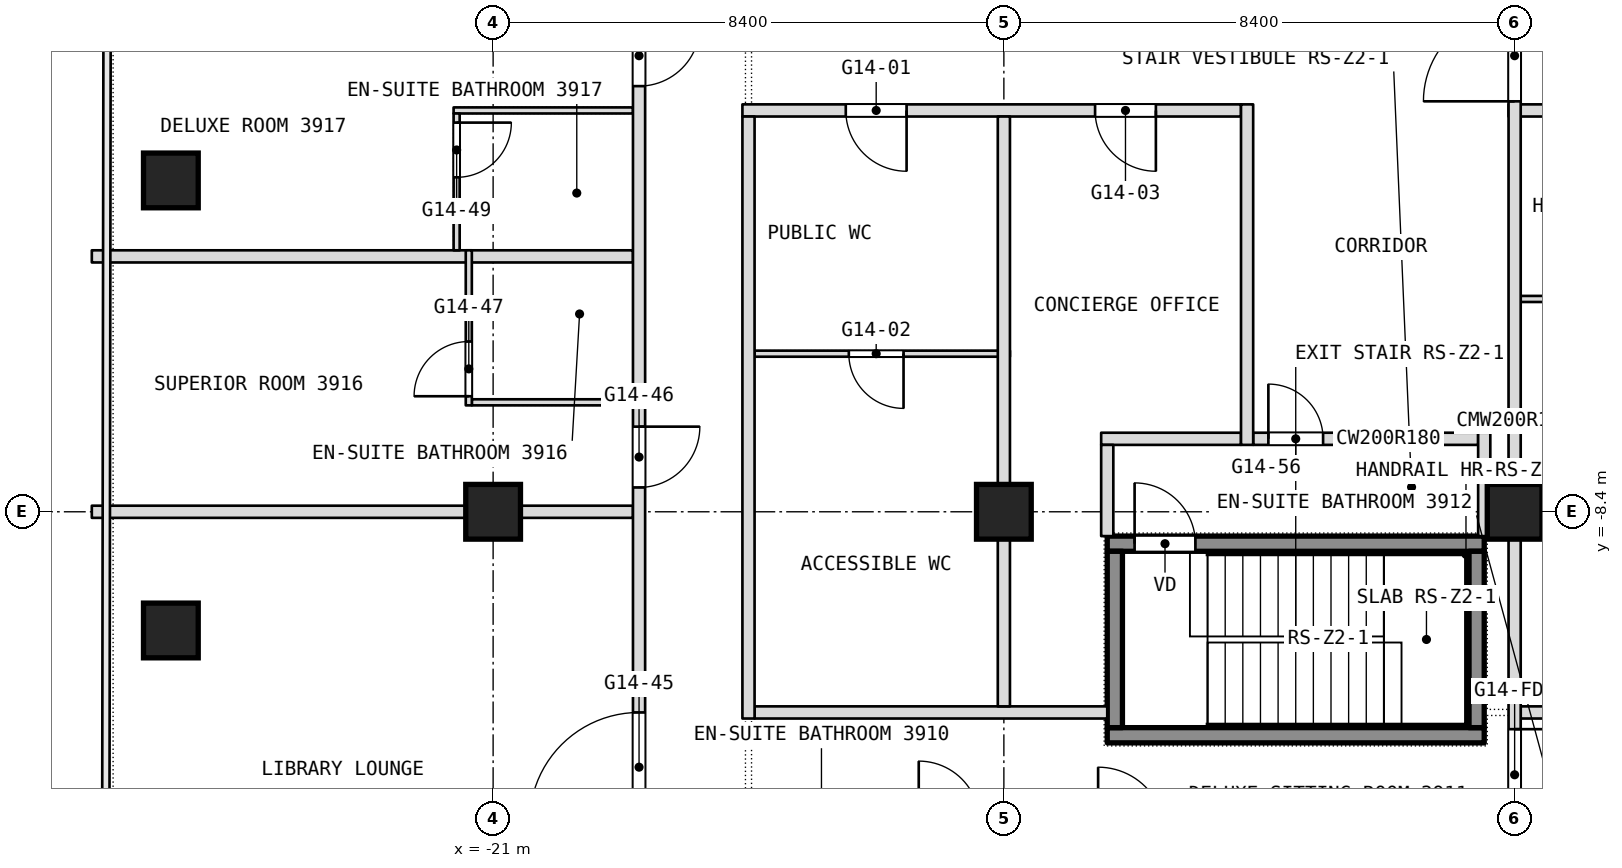
"""IFC4 building model, lengths in metres.
Left out: names, types, materials, properties, quantities, classifications, styles, units other than length and angle.
Written with IfcOpenShell. Run it as: python <this file> out.ifc"""

import sys

from ifc_helpers import new_model, si_unit, direction, frame, frame_2d, origin, origin_2d, place, context, subcontext, project, spatial, rectangle, extrude, element, fill, save


model = new_model("IFC4")
c1 = context("Model", 3, precision=1e-05, world=origin(), true_north=direction((0.0, 1.0)))
c2 = subcontext(c1, "Body", "Model", "MODEL_VIEW")
j1 = project(units=[si_unit("LENGTHUNIT", "METRE"), si_unit("PLANEANGLEUNIT", "RADIAN")], contexts=[c1])
p1 = place(None, origin())
s1 = spatial("IfcSite", under=j1, at=p1, CompositionType="ELEMENT")
p2 = place(p1, origin())
s2 = spatial("IfcBuilding", under=s1, at=p2, CompositionType="ELEMENT")
p3 = place(p2, frame((0.0, 0.0, 166.1)))
s3 = spatial("IfcBuildingStorey", under=s2, at=p3, CompositionType="ELEMENT", Elevation=166.1)
for number, where, z_axis, x_axis in (
    (1, (-21.0, -8.4, 0.0), (0.0, 0.0, 1.0), (1.0, 0.0, 0.0)),
    (2, (-12.6, -8.4, 0.0), (0.0, 0.0, 1.0), (1.0, 0.0, 0.0)),
    (3, (-4.2, -8.4, 0.0), (0.0, 0.0, 1.0), (1.0, 0.0, 0.0)),
    (4, (-26.3, -10.352, 0.0), (0.0, 0.0, 1.0), (1.0, 0.0, 0.0)),
    (5, (-26.3, -2.951, 0.0), (0.0, 0.0, 1.0), (1.0, 0.0, 0.0)),
):
    element("IfcColumn", number, at=place(p3, frame(where, z_axis=z_axis, x_axis=x_axis)), inside=s3, PredefinedType="COLUMN", context=c2, shape_type="SweptSolid", body=[
        extrude(rectangle(XDim=0.9, YDim=0.9, at=origin_2d()), origin(), (0.0, 0.0, 1.0), 3.6),
    ])
p4 = place(p3, frame((-16.7, -11.7, 0.0), z_axis=(0.0, 0.0, 1.0), x_axis=(1.0, 0.0, 0.0)))
e6 = element("IfcWall", 6, at=p4, inside=s3, PredefinedType="PARTITIONING", context=c2, shape_type="SweptSolid", body=[
    extrude(rectangle(XDim=5.8, YDim=0.2, at=frame_2d((2.9, 0.0))), origin(), (0.0, 0.0, 1.0), 3.3),
])
p5 = place(p3, frame((-4.1, -11.7, 0.0), z_axis=(0.0, 0.0, 1.0), x_axis=(1.0, 0.0, 0.0)))
e7 = element("IfcWall", 7, at=p5, inside=s3, PredefinedType="PARTITIONING", context=c2, shape_type="SweptSolid", body=[
    extrude(rectangle(XDim=20.8, YDim=0.2, at=frame_2d((10.4, 0.0))), origin(), (0.0, 0.0, 1.0), 3.3),
])
p6 = place(p5, frame((14.1, 0.0, 0.0)))
e8 = element("IfcOpeningElement", 8, at=p6, cuts=e7, PredefinedType="OPENING", context=c2, shape_type="SweptSolid", body=[
    extrude(rectangle(XDim=1.0, YDim=2.1, at=frame_2d((0.5, 1.05))), frame((0.0, 0.1, 0.0), z_axis=(0.0, -1.0, 0.0), x_axis=(1.0, 0.0, 0.0)), (0.0, 0.0, 1.0), 0.2),
])
p7 = place(p5, frame((5.7, 0.0, 0.0)))
e9 = element("IfcOpeningElement", 9, at=p7, cuts=e7, PredefinedType="OPENING", context=c2, shape_type="SweptSolid", body=[
    extrude(rectangle(XDim=1.0, YDim=2.1, at=frame_2d((0.5, 1.05))), frame((0.0, 0.1, 0.0), z_axis=(0.0, -1.0, 0.0), x_axis=(1.0, 0.0, 0.0)), (0.0, 0.0, 1.0), 0.2),
])
p8 = place(p3, frame((-27.6, -8.4, 0.0), z_axis=(0.0, 0.0, 1.0), x_axis=(1.0, 0.0, 0.0)))
e10 = element("IfcWall", 10, at=p8, inside=s3, PredefinedType="PARTITIONING", context=c2, shape_type="SweptSolid", body=[
    extrude(rectangle(XDim=8.9, YDim=0.2, at=frame_2d((4.45, 0.0))), origin(), (0.0, 0.0, 1.0), 2.85),
])
p9 = place(p3, frame((-11.0, -7.2, 0.0), z_axis=(0.0, 0.0, 1.0), x_axis=(1.0, 0.0, 0.0)))
e11 = element("IfcWall", 11, at=p9, inside=s3, PredefinedType="PARTITIONING", context=c2, shape_type="SweptSolid", body=[
    extrude(rectangle(XDim=2.3, YDim=0.2, at=frame_2d((1.15, 0.0))), origin(), (0.0, 0.0, 1.0), 3.3),
])
p10 = place(p3, frame((-8.5, -7.2, 0.0), z_axis=(0.0, 0.0, 1.0), x_axis=(1.0, 0.0, 0.0)))
e12 = element("IfcWall", 12, at=p10, inside=s3, PredefinedType="PARTITIONING", context=c2, shape_type="SweptSolid", body=[
    extrude(rectangle(XDim=3.7, YDim=0.2, at=frame_2d((1.85, 0.0))), origin(), (0.0, 0.0, 1.0), 3.3),
])
p11 = place(p10, frame((0.25, 0.0, 0.0)))
e13 = element("IfcOpeningElement", 13, at=p11, cuts=e12, PredefinedType="OPENING", context=c2, shape_type="SweptSolid", body=[
    extrude(rectangle(XDim=0.9, YDim=2.1, at=frame_2d((0.45, 1.05))), frame((0.0, 0.1, 0.0), z_axis=(0.0, -1.0, 0.0), x_axis=(1.0, 0.0, 0.0)), (0.0, 0.0, 1.0), 0.2),
])
p12 = place(p3, frame((-21.35, -6.6, 0.0), z_axis=(0.0, 0.0, 1.0), x_axis=(1.0, 0.0, 0.0)))
e14 = element("IfcWall", 14, at=p12, inside=s3, PredefinedType="PARTITIONING", context=c2, shape_type="SweptSolid", body=[
    extrude(rectangle(XDim=2.65, YDim=0.1, at=frame_2d((1.325, 0.0))), origin(), (0.0, 0.0, 1.0), 3.3),
])
p13 = place(p3, frame((-16.7, -5.8, 0.0), z_axis=(0.0, 0.0, 1.0), x_axis=(1.0, 0.0, 0.0)))
e15 = element("IfcWall", 15, at=p13, inside=s3, PredefinedType="PARTITIONING", context=c2, shape_type="SweptSolid", body=[
    extrude(rectangle(XDim=4.2, YDim=0.1, at=frame_2d((2.1, 0.0))), origin(), (0.0, 0.0, 1.0), 3.3),
])
p14 = place(p13, frame((1.55, 0.0, 0.0)))
e16 = element("IfcOpeningElement", 16, at=p14, cuts=e15, PredefinedType="OPENING", context=c2, shape_type="SweptSolid", body=[
    extrude(rectangle(XDim=0.9, YDim=2.1, at=frame_2d((0.45, 1.05))), frame((0.0, 0.05, 0.0), z_axis=(0.0, -1.0, 0.0), x_axis=(1.0, 0.0, 0.0)), (0.0, 0.0, 1.0), 0.1),
])
p15 = place(p3, frame((-4.1, -4.9, 0.0), z_axis=(0.0, 0.0, 1.0), x_axis=(1.0, 0.0, 0.0)))
e17 = element("IfcWall", 17, at=p15, inside=s3, PredefinedType="PARTITIONING", context=c2, shape_type="SweptSolid", body=[
    extrude(rectangle(XDim=4.2, YDim=0.1, at=frame_2d((2.1, 0.0))), origin(), (0.0, 0.0, 1.0), 3.3),
])
p16 = place(p15, frame((1.55, 0.0, 0.0)))
e18 = element("IfcOpeningElement", 18, at=p16, cuts=e17, PredefinedType="OPENING", context=c2, shape_type="SweptSolid", body=[
    extrude(rectangle(XDim=0.9, YDim=2.1, at=frame_2d((0.45, 1.05))), frame((0.0, 0.05, 0.0), z_axis=(0.0, -1.0, 0.0), x_axis=(1.0, 0.0, 0.0)), (0.0, 0.0, 1.0), 0.1),
])
p17 = place(p3, frame((-27.6, -4.2, 0.0), z_axis=(0.0, 0.0, 1.0), x_axis=(1.0, 0.0, 0.0)))
e19 = element("IfcWall", 19, at=p17, inside=s3, PredefinedType="PARTITIONING", context=c2, shape_type="SweptSolid", body=[
    extrude(rectangle(XDim=8.9, YDim=0.2, at=frame_2d((4.45, 0.0))), origin(), (0.0, 0.0, 1.0), 3.3),
])
p18 = place(p3, frame((-21.65, -1.8, 0.0), z_axis=(0.0, 0.0, 1.0), x_axis=(1.0, 0.0, 0.0)))
e20 = element("IfcWall", 20, at=p18, inside=s3, PredefinedType="PARTITIONING", context=c2, shape_type="SweptSolid", body=[
    extrude(rectangle(XDim=2.95, YDim=0.1, at=frame_2d((1.475, 0.0))), origin(), (0.0, 0.0, 1.0), 3.3),
])
p19 = place(p3, frame((-16.9, -1.8, 0.0), z_axis=(0.0, 0.0, 1.0), x_axis=(1.0, 0.0, 0.0)))
e21 = element("IfcWall", 21, at=p19, inside=s3, PredefinedType="PARTITIONING", context=c2, shape_type="SweptSolid", body=[
    extrude(rectangle(XDim=8.2, YDim=0.2, at=frame_2d((4.1, 0.0))), origin(), (0.0, 0.0, 1.0), 3.3),
])
p20 = place(p19, frame((1.7, 0.0, 0.0)))
e22 = element("IfcOpeningElement", 22, at=p20, cuts=e21, PredefinedType="OPENING", context=c2, shape_type="SweptSolid", body=[
    extrude(rectangle(XDim=1.0, YDim=2.1, at=frame_2d((0.5, 1.05))), frame((0.0, 0.1, 0.0), z_axis=(0.0, -1.0, 0.0), x_axis=(1.0, 0.0, 0.0)), (0.0, 0.0, 1.0), 0.2),
])
p21 = place(p19, frame((5.8, 0.0, 0.0)))
e23 = element("IfcOpeningElement", 23, at=p21, cuts=e21, PredefinedType="OPENING", context=c2, shape_type="SweptSolid", body=[
    extrude(rectangle(XDim=1.0, YDim=2.1, at=frame_2d((0.5, 1.05))), frame((0.0, 0.1, 0.0), z_axis=(0.0, -1.0, 0.0), x_axis=(1.0, 0.0, 0.0)), (0.0, 0.0, 1.0), 0.2),
])
p22 = place(p3, frame((-4.3, -1.8, 0.0), z_axis=(0.0, 0.0, 1.0), x_axis=(1.0, 0.0, 0.0)))
e24 = element("IfcWall", 24, at=p22, inside=s3, PredefinedType="PARTITIONING", context=c2, shape_type="SweptSolid", body=[
    extrude(rectangle(XDim=11.3, YDim=0.2, at=frame_2d((5.65, 0.0))), origin(), (0.0, 0.0, 1.0), 3.3),
])
p23 = place(p22, frame((1.7, 0.0, 0.0)))
e25 = element("IfcOpeningElement", 25, at=p23, cuts=e24, PredefinedType="OPENING", context=c2, shape_type="SweptSolid", body=[
    extrude(rectangle(XDim=1.0, YDim=2.1, at=frame_2d((0.5, 1.05))), frame((0.0, 0.1, 0.0), z_axis=(0.0, -1.0, 0.0), x_axis=(1.0, 0.0, 0.0)), (0.0, 0.0, 1.0), 0.2),
])
p24 = place(p22, frame((10.1, 0.0, 0.0)))
e26 = element("IfcOpeningElement", 26, at=p24, cuts=e24, PredefinedType="OPENING", context=c2, shape_type="SweptSolid", body=[
    extrude(rectangle(XDim=1.0, YDim=2.1, at=frame_2d((0.5, 1.05))), frame((0.0, 0.1, 0.0), z_axis=(0.0, -1.0, 0.0), x_axis=(1.0, 0.0, 0.0)), (0.0, 0.0, 1.0), 0.2),
])
p25 = place(p22, frame((5.9, 0.0, 0.0)))
e27 = element("IfcOpeningElement", 27, at=p25, cuts=e24, PredefinedType="OPENING", context=c2, shape_type="SweptSolid", body=[
    extrude(rectangle(XDim=1.0, YDim=2.1, at=frame_2d((0.5, 1.05))), frame((0.0, 0.1, 0.0), z_axis=(0.0, -1.0, 0.0), x_axis=(1.0, 0.0, 0.0)), (0.0, 0.0, 1.0), 0.2),
])
p26 = place(p3, frame((-4.2, -13.8, 0.0), z_axis=(0.0, 0.0, 1.0), x_axis=(0.0, 1.0, 0.0)))
e28 = element("IfcWall", 28, at=p26, inside=s3, PredefinedType="PARTITIONING", context=c2, shape_type="SweptSolid", body=[
    extrude(rectangle(XDim=13.8, YDim=0.2, at=frame_2d((6.9, 0.0))), origin(), (0.0, 0.0, 1.0), 2.486),
])
p27 = place(p26, frame((12.15, 0.0, 0.0)))
e29 = element("IfcOpeningElement", 29, at=p27, cuts=e28, PredefinedType="OPENING", context=c2, shape_type="SweptSolid", body=[
    extrude(rectangle(XDim=1.5, YDim=2.1, at=frame_2d((0.75, 1.05))), frame((0.0, 0.1, 0.0), z_axis=(0.0, -1.0, 0.0), x_axis=(1.0, 0.0, 0.0)), (0.0, 0.0, 1.0), 0.2),
])
p28 = place(p26, frame((0.325, 0.0, 0.0)))
e30 = element("IfcOpeningElement", 30, at=p28, cuts=e28, PredefinedType="OPENING", context=c2, shape_type="SweptSolid", body=[
    extrude(rectangle(XDim=1.5, YDim=2.1, at=frame_2d((0.75, 1.05))), frame((0.0, 0.1, 0.0), z_axis=(0.0, -1.0, 0.0), x_axis=(1.0, 0.0, 0.0)), (0.0, 0.0, 1.0), 0.2),
])
p29 = place(p3, frame((-4.7, -8.8, 0.0), z_axis=(0.0, 0.0, 1.0), x_axis=(0.0, 1.0, 0.0)))
e31 = element("IfcWall", 31, at=p29, inside=s3, PredefinedType="PARTITIONING", context=c2, shape_type="SweptSolid", body=[
    extrude(rectangle(XDim=1.7, YDim=0.2, at=frame_2d((0.85, 0.0))), origin(), (0.0, 0.0, 1.0), 3.3),
])
p30 = place(p3, frame((-8.6, -7.3, 0.0), z_axis=(0.0, 0.0, 1.0), x_axis=(0.0, 1.0, 0.0)))
e32 = element("IfcWall", 32, at=p30, inside=s3, PredefinedType="PARTITIONING", context=c2, shape_type="SweptSolid", body=[
    extrude(rectangle(XDim=5.6, YDim=0.2, at=frame_2d((2.8, 0.0))), origin(), (0.0, 0.0, 1.0), 3.3),
])
p31 = place(p3, frame((-10.9, -8.8, 0.0), z_axis=(0.0, 0.0, 1.0), x_axis=(0.0, 1.0, 0.0)))
e33 = element("IfcWall", 33, at=p31, inside=s3, PredefinedType="PARTITIONING", context=c2, shape_type="SweptSolid", body=[
    extrude(rectangle(XDim=1.5, YDim=0.2, at=frame_2d((0.75, 0.0))), origin(), (0.0, 0.0, 1.0), 3.3),
])
p32 = place(p3, frame((-12.6, -11.6, 0.0), z_axis=(0.0, 0.0, 1.0), x_axis=(0.0, 1.0, 0.0)))
e34 = element("IfcWall", 34, at=p32, inside=s3, PredefinedType="PARTITIONING", context=c2, shape_type="SweptSolid", body=[
    extrude(rectangle(XDim=9.7, YDim=0.2, at=frame_2d((4.85, 0.0))), origin(), (0.0, 0.0, 1.0), 2.486),
])
p33 = place(p3, frame((-16.8, -11.8, 0.0), z_axis=(0.0, 0.0, 1.0), x_axis=(0.0, 1.0, 0.0)))
e35 = element("IfcWall", 35, at=p33, inside=s3, PredefinedType="PARTITIONING", context=c2, shape_type="SweptSolid", body=[
    extrude(rectangle(XDim=9.9, YDim=0.2, at=frame_2d((4.95, 0.0))), origin(), (0.0, 0.0, 1.0), 3.3),
])
p34 = place(p3, frame((-18.6, -21.708, 0.0), z_axis=(0.0, 0.0, 1.0), x_axis=(0.0, 1.0, 0.0)))
e36 = element("IfcWall", 36, at=p34, inside=s3, PredefinedType="PARTITIONING", context=c2, shape_type="SweptSolid", body=[
    extrude(rectangle(XDim=28.608, YDim=0.2, at=frame_2d((14.304, 0.0))), origin(), (0.0, 0.0, 1.0), 3.3),
])
p35 = place(p34, frame((2.204, 0.0, 0.0)))
e37 = element("IfcOpeningElement", 37, at=p35, cuts=e36, PredefinedType="OPENING", context=c2, shape_type="SweptSolid", body=[
    extrude(rectangle(XDim=1.0, YDim=2.1, at=frame_2d((0.5, 1.05))), frame((0.0, 0.1, 0.0), z_axis=(0.0, -1.0, 0.0), x_axis=(1.0, 0.0, 0.0)), (0.0, 0.0, 1.0), 0.2),
])
p36 = place(p34, frame((8.208, 0.0, 0.0)))
e38 = element("IfcOpeningElement", 38, at=p36, cuts=e36, PredefinedType="OPENING", context=c2, shape_type="SweptSolid", body=[
    extrude(rectangle(XDim=1.8, YDim=2.1, at=frame_2d((0.9, 1.05))), frame((0.0, 0.1, 0.0), z_axis=(0.0, -1.0, 0.0), x_axis=(1.0, 0.0, 0.0)), (0.0, 0.0, 1.0), 0.2),
])
p37 = place(p34, frame((13.708, 0.0, 0.0)))
e39 = element("IfcOpeningElement", 39, at=p37, cuts=e36, PredefinedType="OPENING", context=c2, shape_type="SweptSolid", body=[
    extrude(rectangle(XDim=1.0, YDim=2.1, at=frame_2d((0.5, 1.05))), frame((0.0, 0.1, 0.0), z_axis=(0.0, -1.0, 0.0), x_axis=(1.0, 0.0, 0.0)), (0.0, 0.0, 1.0), 0.2),
])
p38 = place(p34, frame((20.308, 0.0, 0.0)))
e40 = element("IfcOpeningElement", 40, at=p38, cuts=e36, PredefinedType="OPENING", context=c2, shape_type="SweptSolid", body=[
    extrude(rectangle(XDim=1.0, YDim=2.1, at=frame_2d((0.5, 1.05))), frame((0.0, 0.1, 0.0), z_axis=(0.0, -1.0, 0.0), x_axis=(1.0, 0.0, 0.0)), (0.0, 0.0, 1.0), 0.2),
])
p39 = place(p3, frame((-21.4, -6.65, 0.0), z_axis=(0.0, 0.0, 1.0), x_axis=(0.0, 1.0, 0.0)))
e41 = element("IfcWall", 41, at=p39, inside=s3, PredefinedType="PARTITIONING", context=c2, shape_type="SweptSolid", body=[
    extrude(rectangle(XDim=2.55, YDim=0.1, at=frame_2d((1.275, 0.0))), origin(), (0.0, 0.0, 1.0), 3.3),
])
p40 = place(p39, frame((0.15, 0.0, 0.0)))
e42 = element("IfcOpeningElement", 42, at=p40, cuts=e41, PredefinedType="OPENING", context=c2, shape_type="SweptSolid", body=[
    extrude(rectangle(XDim=0.9, YDim=2.1, at=frame_2d((0.45, 1.05))), frame((0.0, 0.05, 0.0), z_axis=(0.0, -1.0, 0.0), x_axis=(1.0, 0.0, 0.0)), (0.0, 0.0, 1.0), 0.1),
])
p41 = place(p3, frame((-21.6, -4.1, 0.0), z_axis=(0.0, 0.0, 1.0), x_axis=(0.0, 1.0, 0.0)))
e43 = element("IfcWall", 43, at=p41, inside=s3, PredefinedType="PARTITIONING", context=c2, shape_type="SweptSolid", body=[
    extrude(rectangle(XDim=2.25, YDim=0.1, at=frame_2d((1.125, 0.0))), origin(), (0.0, 0.0, 1.0), 3.3),
])
p42 = place(p41, frame((1.2, 0.0, 0.0)))
e44 = element("IfcOpeningElement", 44, at=p42, cuts=e43, PredefinedType="OPENING", context=c2, shape_type="SweptSolid", body=[
    extrude(rectangle(XDim=0.9, YDim=2.1, at=frame_2d((0.45, 1.05))), frame((0.0, 0.05, 0.0), z_axis=(0.0, -1.0, 0.0), x_axis=(1.0, 0.0, 0.0)), (0.0, 0.0, 1.0), 0.1),
])
p43 = place(p3, frame((-10.9, -12.075, 0.1), z_axis=(0.0, 0.0, 1.0), x_axis=(1.0, 0.0, 0.0)))
e45 = element("IfcWall", 45, at=p43, inside=s3, PredefinedType="SHEAR", context=c2, shape_type="SweptSolid", body=[
    extrude(rectangle(XDim=6.2, YDim=0.25, at=frame_2d((3.1, 0.0))), origin(), (0.0, 0.0, 1.0), 3.6),
])
p44 = place(p3, frame((-10.9, -8.925, 0.1), z_axis=(0.0, 0.0, 1.0), x_axis=(1.0, 0.0, 0.0)))
e46 = element("IfcWall", 46, at=p44, inside=s3, PredefinedType="SHEAR", context=c2, shape_type="SweptSolid", body=[
    extrude(rectangle(XDim=6.2, YDim=0.25, at=frame_2d((3.1, 0.0))), origin(), (0.0, 0.0, 1.0), 3.6),
])
p45 = place(p44, frame((0.45, 0.0, 0.0)))
e47 = element("IfcOpeningElement", 47, at=p45, cuts=e46, PredefinedType="OPENING", context=c2, shape_type="SweptSolid", body=[
    extrude(rectangle(XDim=1.0, YDim=2.1, at=frame_2d((0.5, 1.05))), frame((0.0, 0.125, 0.0), z_axis=(0.0, -1.0, 0.0), x_axis=(1.0, 0.0, 0.0)), (0.0, 0.0, 1.0), 0.25),
])
for number, where, z_axis, x_axis in (
    (48, (-10.775, -11.95, 0.1), (0.0, 0.0, 1.0), (0.0, 1.0, 0.0)),
    (49, (-4.825, -11.95, 0.1), (0.0, 0.0, 1.0), (0.0, 1.0, 0.0)),
):
    element("IfcWall", number, at=place(p3, frame(where, z_axis=z_axis, x_axis=x_axis)), inside=s3, PredefinedType="SHEAR", context=c2, shape_type="SweptSolid", body=[
        extrude(rectangle(XDim=2.9, YDim=0.25, at=frame_2d((1.45, 0.0))), origin(), (0.0, 0.0, 1.0), 3.6),
    ])
p46 = place(p11, origin())
e50 = element("IfcDoor", 50, at=p46, inside=s3, OperationType="SINGLE_SWING_RIGHT", PredefinedType="DOOR", context=c2, shape_type="SweptSolid", body=[
    extrude(rectangle(XDim=0.9, YDim=2.1, at=frame_2d((0.45, 1.05))), frame((0.0, 0.025, 0.0), z_axis=(0.0, -1.0, 0.0), x_axis=(1.0, 0.0, 0.0)), (0.0, 0.0, 1.0), 0.05),
])
fill(e13, e50)
p47 = place(p14, origin())
e51 = element("IfcDoor", 51, at=p47, inside=s3, OperationType="SINGLE_SWING_RIGHT", PredefinedType="DOOR", context=c2, shape_type="SweptSolid", body=[
    extrude(rectangle(XDim=0.9, YDim=2.1, at=frame_2d((0.45, 1.05))), frame((0.0, 0.025, 0.0), z_axis=(0.0, -1.0, 0.0), x_axis=(1.0, 0.0, 0.0)), (0.0, 0.0, 1.0), 0.05),
])
fill(e16, e51)
p48 = place(p20, origin())
e52 = element("IfcDoor", 52, at=p48, inside=s3, OperationType="SINGLE_SWING_LEFT", PredefinedType="DOOR", context=c2, shape_type="SweptSolid", body=[
    extrude(rectangle(XDim=1.0, YDim=2.1, at=frame_2d((0.5, 1.05))), frame((0.0, 0.025, 0.0), z_axis=(0.0, -1.0, 0.0), x_axis=(1.0, 0.0, 0.0)), (0.0, 0.0, 1.0), 0.05),
])
fill(e22, e52)
p49 = place(p21, origin())
e53 = element("IfcDoor", 53, at=p49, inside=s3, OperationType="SINGLE_SWING_LEFT", PredefinedType="DOOR", context=c2, shape_type="SweptSolid", body=[
    extrude(rectangle(XDim=1.0, YDim=2.1, at=frame_2d((0.5, 1.05))), frame((0.0, 0.025, 0.0), z_axis=(0.0, -1.0, 0.0), x_axis=(1.0, 0.0, 0.0)), (0.0, 0.0, 1.0), 0.05),
])
fill(e23, e53)
p50 = place(p36, origin())
e54 = element("IfcDoor", 54, at=p50, inside=s3, OperationType="DOUBLE_DOOR_SINGLE_SWING", PredefinedType="DOOR", context=c2, shape_type="SweptSolid", body=[
    extrude(rectangle(XDim=1.8, YDim=2.1, at=frame_2d((0.9, 1.05))), frame((0.0, 0.025, 0.0), z_axis=(0.0, -1.0, 0.0), x_axis=(1.0, 0.0, 0.0)), (0.0, 0.0, 1.0), 0.05),
])
fill(e38, e54)
p51 = place(p37, origin())
e55 = element("IfcDoor", 55, at=p51, inside=s3, OperationType="SINGLE_SWING_LEFT", PredefinedType="DOOR", context=c2, shape_type="SweptSolid", body=[
    extrude(rectangle(XDim=1.0, YDim=2.1, at=frame_2d((0.5, 1.05))), frame((0.0, 0.025, 0.0), z_axis=(0.0, -1.0, 0.0), x_axis=(1.0, 0.0, 0.0)), (0.0, 0.0, 1.0), 0.05),
])
fill(e39, e55)
p52 = place(p38, origin())
e56 = element("IfcDoor", 56, at=p52, inside=s3, OperationType="SINGLE_SWING_LEFT", PredefinedType="DOOR", context=c2, shape_type="SweptSolid", body=[
    extrude(rectangle(XDim=1.0, YDim=2.1, at=frame_2d((0.5, 1.05))), frame((0.0, 0.025, 0.0), z_axis=(0.0, -1.0, 0.0), x_axis=(1.0, 0.0, 0.0)), (0.0, 0.0, 1.0), 0.05),
])
fill(e40, e56)
p53 = place(p40, origin())
e57 = element("IfcDoor", 57, at=p53, inside=s3, OperationType="SINGLE_SWING_RIGHT", PredefinedType="DOOR", context=c2, shape_type="SweptSolid", body=[
    extrude(rectangle(XDim=0.9, YDim=2.1, at=frame_2d((0.45, 1.05))), frame((0.0, 0.025, 0.0), z_axis=(0.0, -1.0, 0.0), x_axis=(1.0, 0.0, 0.0)), (0.0, 0.0, 1.0), 0.05),
])
fill(e42, e57)
p54 = place(p42, origin())
e58 = element("IfcDoor", 58, at=p54, inside=s3, OperationType="SINGLE_SWING_LEFT", PredefinedType="DOOR", context=c2, shape_type="SweptSolid", body=[
    extrude(rectangle(XDim=0.9, YDim=2.1, at=frame_2d((0.45, 1.05))), frame((0.0, 0.025, 0.0), z_axis=(0.0, -1.0, 0.0), x_axis=(1.0, 0.0, 0.0)), (0.0, 0.0, 1.0), 0.05),
])
fill(e44, e58)
p55 = place(p45, origin())
e59 = element("IfcDoor", 59, at=p55, inside=s3, OperationType="SINGLE_SWING_LEFT", PredefinedType="DOOR", context=c2, shape_type="SweptSolid", body=[
    extrude(rectangle(XDim=1.0, YDim=2.1, at=frame_2d((0.5, 1.05))), frame((0.0, 0.025, 0.0), z_axis=(0.0, -1.0, 0.0), x_axis=(1.0, 0.0, 0.0)), (0.0, 0.0, 1.0), 0.05),
])
fill(e47, e59)
p56 = place(p27, origin())
e60 = element("IfcDoor", 60, at=p56, inside=s3, OperationType="DOUBLE_DOOR_DOUBLE_SWING", PredefinedType="DOOR", context=c2, shape_type="SweptSolid", body=[
    extrude(rectangle(XDim=1.5, YDim=2.1, at=frame_2d((0.75, 1.05))), frame((0.0, 0.025, 0.0), z_axis=(0.0, -1.0, 0.0), x_axis=(1.0, 0.0, 0.0)), (0.0, 0.0, 1.0), 0.05),
])
fill(e29, e60)
p57 = place(p28, origin())
e61 = element("IfcDoor", 61, at=p57, inside=s3, OperationType="DOUBLE_DOOR_DOUBLE_SWING", PredefinedType="DOOR", context=c2, shape_type="SweptSolid", body=[
    extrude(rectangle(XDim=1.5, YDim=2.1, at=frame_2d((0.75, 1.05))), frame((0.0, 0.025, 0.0), z_axis=(0.0, -1.0, 0.0), x_axis=(1.0, 0.0, 0.0)), (0.0, 0.0, 1.0), 0.05),
])
fill(e30, e61)
save(model, sys.argv[1])
